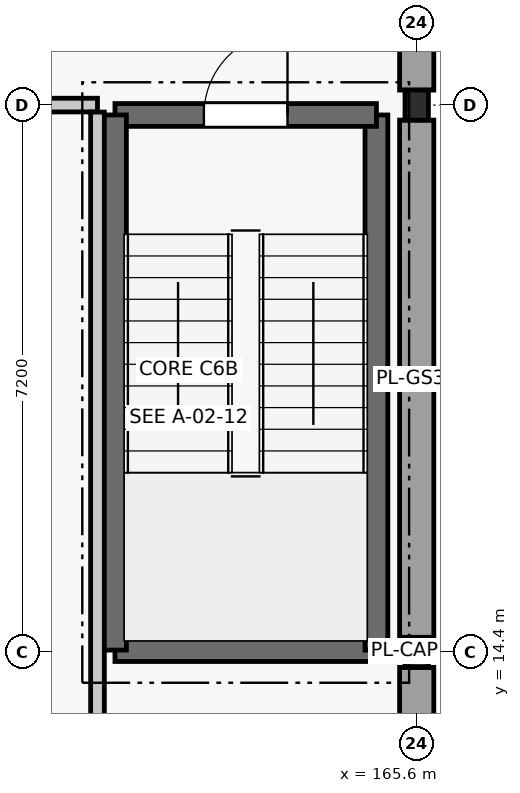
"""IFC4 building model, lengths in metres.
Left out: names, types, materials, properties, quantities, classifications, styles, units other than length and angle.
Written with IfcOpenShell. Run it as: python <this file> out.ifc"""

import sys

from ifc_helpers import new_model, si_unit, direction, frame, frame_2d, origin, origin_2d, place, context, subcontext, project, spatial, rectangle, i_section, extrude, element, fill, save


model = new_model("IFC4")
c1 = context("Model", 3, precision=1e-05, world=origin(), true_north=direction((0.0, 1.0)))
c2 = subcontext(c1, "Body", "Model", "MODEL_VIEW")
j1 = project(units=[si_unit("LENGTHUNIT", "METRE"), si_unit("PLANEANGLEUNIT", "RADIAN")], contexts=[c1])
p1 = place(None, origin())
s1 = spatial("IfcSite", under=j1, at=p1, CompositionType="ELEMENT")
p2 = place(p1, origin())
s2 = spatial("IfcBuilding", under=s1, at=p2, CompositionType="ELEMENT")
p3 = place(p2, frame((0.0, 0.0, -4.2)))
s3 = spatial("IfcBuildingStorey", under=s2, at=p3, CompositionType="ELEMENT", Elevation=-4.2)
for number, where, z_axis, x_axis in (
    (1, (165.6, 14.4, 0.0), (0.0, 0.0, 1.0), (1.0, 0.0, 0.0)),
    (2, (165.6, 21.6, 0.0), (0.0, 0.0, 1.0), (1.0, 0.0, 0.0)),
):
    element("IfcColumn", number, at=place(p3, frame(where, z_axis=z_axis, x_axis=x_axis)), inside=s3, PredefinedType="COLUMN", context=c2, shape_type="SweptSolid", body=[
        extrude(i_section(OverallWidth=0.308, OverallDepth=0.395, WebThickness=0.021, FlangeThickness=0.036, FilletRadius=0.027, at=origin_2d()), origin(), (0.0, 0.0, 1.0), 4.2),
    ])
p4 = place(p3, frame((165.6, 7.397, 0.0), z_axis=(0.0, 0.0, 1.0), x_axis=(0.0, 1.0, 0.0)))
e3 = element("IfcWall", 3, at=p4, inside=s3, PredefinedType="USERDEFINED", context=c2, shape_type="SweptSolid", body=[
    extrude(rectangle(XDim=6.805, YDim=0.45, at=frame_2d((3.402, 0.0))), origin(), (0.0, 0.0, 1.0), 3.26),
])
p5 = place(p3, frame((165.6, 14.597, 0.0), z_axis=(0.0, 0.0, 1.0), x_axis=(0.0, 1.0, 0.0)))
e4 = element("IfcWall", 4, at=p5, inside=s3, PredefinedType="USERDEFINED", context=c2, shape_type="SweptSolid", body=[
    extrude(rectangle(XDim=6.805, YDim=0.45, at=frame_2d((3.403, 0.0))), origin(), (0.0, 0.0, 1.0), 3.26),
])
p6 = place(p3, frame((165.6, 21.798, 0.0), z_axis=(0.0, 0.0, 1.0), x_axis=(0.0, 1.0, 0.0)))
e5 = element("IfcWall", 5, at=p6, inside=s3, PredefinedType="USERDEFINED", context=c2, shape_type="SweptSolid", body=[
    extrude(rectangle(XDim=6.805, YDim=0.45, at=frame_2d((3.402, 0.0))), origin(), (0.0, 0.0, 1.0), 3.26),
])
p7 = place(p3, frame((161.63, 14.43, 0.0), z_axis=(0.0, 0.0, 1.0), x_axis=(1.0, 0.0, 0.0)))
e6 = element("IfcWall", 6, at=p7, inside=s3, PredefinedType="SHEAR", context=c2, shape_type="SweptSolid", body=[
    extrude(rectangle(XDim=3.44, YDim=0.3, at=frame_2d((1.72, 0.0))), origin(), (0.0, 0.0, 1.0), 3.88),
])
p8 = place(p3, frame((165.07, 14.43, 0.0), z_axis=(0.0, 0.0, 1.0), x_axis=(0.0, 1.0, 0.0)))
e7 = element("IfcWall", 7, at=p8, inside=s3, PredefinedType="SHEAR", context=c2, shape_type="SweptSolid", body=[
    extrude(rectangle(XDim=7.04, YDim=0.3, at=frame_2d((3.52, 0.0))), origin(), (0.0, 0.0, 1.0), 3.88),
])
p9 = place(p3, frame((165.07, 21.47, 0.0), z_axis=(0.0, 0.0, 1.0), x_axis=(-1.0, 0.0, 0.0)))
e8 = element("IfcWall", 8, at=p9, inside=s3, PredefinedType="SHEAR", context=c2, shape_type="SweptSolid", body=[
    extrude(rectangle(XDim=3.44, YDim=0.3, at=frame_2d((1.72, 0.0))), origin(), (0.0, 0.0, 1.0), 3.88),
])
p10 = place(p9, frame((1.17, 0.0, 0.0)))
e9 = element("IfcOpeningElement", 9, at=p10, cuts=e8, PredefinedType="OPENING", context=c2, shape_type="SweptSolid", body=[
    extrude(rectangle(XDim=1.1, YDim=2.15, at=frame_2d((0.55, 1.075))), frame((0.0, 0.162, 0.0), z_axis=(0.0, -1.0, 0.0), x_axis=(1.0, 0.0, 0.0)), (0.0, 0.0, 1.0), 0.324),
])
p11 = place(p3, frame((161.63, 21.47, 0.0), z_axis=(0.0, 0.0, 1.0), x_axis=(0.0, -1.0, 0.0)))
e10 = element("IfcWall", 10, at=p11, inside=s3, PredefinedType="SHEAR", context=c2, shape_type="SweptSolid", body=[
    extrude(rectangle(XDim=7.04, YDim=0.3, at=frame_2d((3.52, 0.0))), origin(), (0.0, 0.0, 1.0), 3.88),
])
p12 = place(p3, frame((158.558, 21.6, 0.0), z_axis=(0.0, 0.0, 1.0), x_axis=(1.0, 0.0, 0.0)))
e11 = element("IfcWall", 11, at=p12, inside=s3, PredefinedType="PARTITIONING", context=c2, shape_type="SweptSolid", body=[
    extrude(rectangle(XDim=2.842, YDim=0.18, at=frame_2d((1.421, 0.0))), origin(), (0.0, 0.0, 1.0), 3.465),
])
p13 = place(p3, frame((161.4, 7.425, 0.0), z_axis=(0.0, 0.0, 1.0), x_axis=(0.0, 1.0, 0.0)))
e12 = element("IfcWall", 12, at=p13, inside=s3, PredefinedType="PARTITIONING", context=c2, shape_type="SweptSolid", body=[
    extrude(rectangle(XDim=14.083, YDim=0.18, at=frame_2d((7.042, 0.0))), origin(), (0.0, 0.0, 1.0), 3.465),
])
p14 = place(p10, frame((1.1, 0.0, 0.0), z_axis=(0.0, 0.0, 1.0), x_axis=(-1.0, 0.0, 0.0)))
e13 = element("IfcDoor", 13, at=p14, inside=s3, OperationType="SINGLE_SWING_RIGHT", PredefinedType="DOOR", context=c2, shape_type="SweptSolid", body=[
    extrude(rectangle(XDim=1.1, YDim=2.15, at=frame_2d((0.55, 1.075))), frame((0.0, 0.025, 0.0), z_axis=(0.0, -1.0, 0.0), x_axis=(1.0, 0.0, 0.0)), (0.0, 0.0, 1.0), 0.05),
])
fill(e9, e13)
save(model, sys.argv[1])
